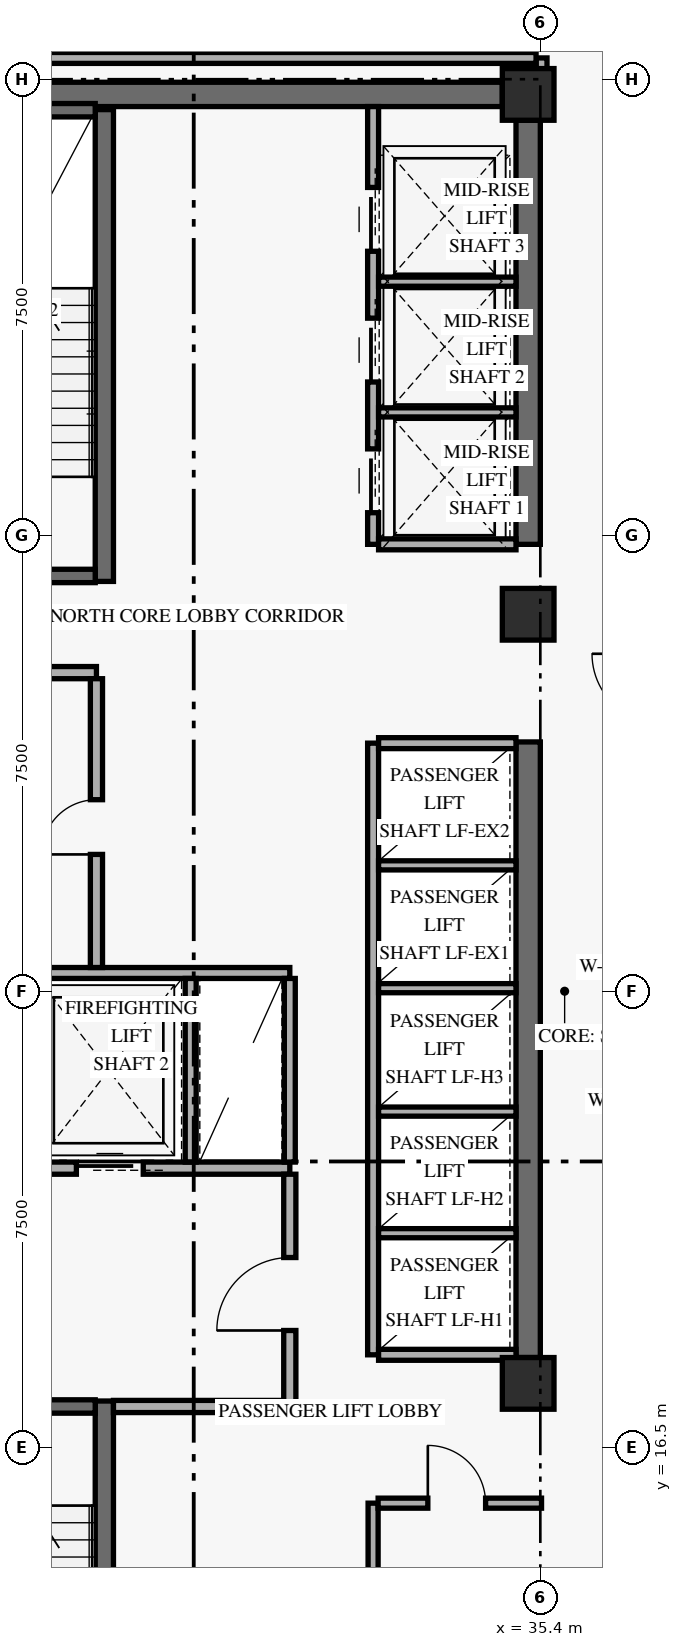
"""IFC4 building model, lengths in metres.
Left out: names, types, materials, properties, quantities, classifications, styles, units other than length and angle.
Written with IfcOpenShell. Run it as: python <this file> out.ifc"""

import sys

from ifc_helpers import new_model, si_unit, direction, frame, frame_2d, origin, origin_2d, place, context, subcontext, project, spatial, rectangle, extrude, element, fill, save


model = new_model("IFC4")
c1 = context("Model", 3, precision=1e-05, world=origin(), true_north=direction((0.0, 1.0)))
c2 = subcontext(c1, "Body", "Model", "MODEL_VIEW")
j1 = project(units=[si_unit("LENGTHUNIT", "METRE"), si_unit("PLANEANGLEUNIT", "RADIAN")], contexts=[c1])
p1 = place(None, origin())
s1 = spatial("IfcSite", under=j1, at=p1, CompositionType="ELEMENT")
p2 = place(p1, origin())
s2 = spatial("IfcBuilding", under=s1, at=p2, CompositionType="ELEMENT")
p3 = place(p2, frame((0.0, 0.0, 117.0)))
s3 = spatial("IfcBuildingStorey", under=s2, at=p3, CompositionType="ELEMENT", Elevation=117.0)
p4 = place(p3, frame((35.2, 17.975, 0.0), z_axis=(0.0, 0.0, 1.0), x_axis=(0.0, 1.0, 0.0)))
e1 = element("IfcWall", 1, at=p4, inside=s3, PredefinedType="SHEAR", context=c2, shape_type="SweptSolid", body=[
    extrude(rectangle(XDim=10.125, YDim=0.4, at=frame_2d((5.062, 0.0))), origin(), (0.0, 0.0, 1.0), 3.349),
])
p5 = place(p3, frame((35.2, 31.35, 0.0), z_axis=(0.0, 0.0, 1.0), x_axis=(0.0, 1.0, 0.0)))
e2 = element("IfcWall", 2, at=p5, inside=s3, PredefinedType="SHEAR", context=c2, shape_type="SweptSolid", body=[
    extrude(rectangle(XDim=6.975, YDim=0.4, at=frame_2d((3.487, 0.0))), origin(), (0.0, 0.0, 1.0), 3.349),
])
p6 = place(p3, frame((24.625, 38.75, 0.0), z_axis=(0.0, 0.0, 1.0), x_axis=(1.0, 0.0, 0.0)))
e3 = element("IfcWall", 3, at=p6, inside=s3, PredefinedType="SHEAR", context=c2, shape_type="SweptSolid", body=[
    extrude(rectangle(XDim=10.15, YDim=0.4, at=frame_2d((5.075, 0.0))), origin(), (0.0, 0.0, 1.0), 3.96),
])
p7 = place(p3, frame((28.23, 9.5, 0.0), z_axis=(0.0, 0.0, 1.0), x_axis=(0.0, 1.0, 0.0)))
e4 = element("IfcWall", 4, at=p7, inside=s3, PredefinedType="SHEAR", context=c2, shape_type="SweptSolid", body=[
    extrude(rectangle(XDim=7.76, YDim=0.3, at=frame_2d((3.88, 0.0))), origin(), (0.0, 0.0, 1.0), 3.96),
])
p8 = place(p3, frame((24.92, 17.17, 0.0), z_axis=(0.0, 0.0, 1.0), x_axis=(1.0, 0.0, 0.0)))
e5 = element("IfcWall", 5, at=p8, inside=s3, PredefinedType="SHEAR", context=c2, shape_type="SweptSolid", body=[
    extrude(rectangle(XDim=3.16, YDim=0.22, at=frame_2d((1.58, 0.0))), origin(), (0.0, 0.0, 1.0), 3.96),
])
p9 = place(p8, frame((0.78, 0.0, 0.0)))
e6 = element("IfcOpeningElement", 6, at=p9, cuts=e5, PredefinedType="OPENING", context=c2, shape_type="SweptSolid", body=[
    extrude(rectangle(XDim=1.05, YDim=2.15, at=frame_2d((0.525, 1.075))), frame((0.0, 0.12, 0.0), z_axis=(0.0, -1.0, 0.0), x_axis=(1.0, 0.0, 0.0)), (0.0, 0.0, 1.0), 0.24),
])
p10 = place(p3, frame((28.23, 30.74, 0.0), z_axis=(0.0, 0.0, 1.0), x_axis=(0.0, 1.0, 0.0)))
e7 = element("IfcWall", 7, at=p10, inside=s3, PredefinedType="SHEAR", context=c2, shape_type="SweptSolid", body=[
    extrude(rectangle(XDim=7.76, YDim=0.3, at=frame_2d((3.88, 0.0))), origin(), (0.0, 0.0, 1.0), 3.96),
])
p11 = place(p3, frame((24.92, 30.83, 0.0), z_axis=(0.0, 0.0, 1.0), x_axis=(1.0, 0.0, 0.0)))
e8 = element("IfcWall", 8, at=p11, inside=s3, PredefinedType="SHEAR", context=c2, shape_type="SweptSolid", body=[
    extrude(rectangle(XDim=3.16, YDim=0.22, at=frame_2d((1.58, 0.0))), origin(), (0.0, 0.0, 1.0), 3.96),
])
p12 = place(p11, frame((0.78, 0.0, 0.0)))
e9 = element("IfcOpeningElement", 9, at=p12, cuts=e8, PredefinedType="OPENING", context=c2, shape_type="SweptSolid", body=[
    extrude(rectangle(XDim=1.05, YDim=2.15, at=frame_2d((0.525, 1.075))), frame((0.0, 0.12, 0.0), z_axis=(0.0, -1.0, 0.0), x_axis=(1.0, 0.0, 0.0)), (0.0, 0.0, 1.0), 0.24),
])
p13 = place(p3, frame((24.92, 38.49, 0.0), z_axis=(0.0, 0.0, 1.0), x_axis=(1.0, 0.0, 0.0)))
e10 = element("IfcWall", 10, at=p13, inside=s3, PredefinedType="SHEAR", context=c2, shape_type="SweptSolid", body=[
    extrude(rectangle(XDim=3.16, YDim=0.22, at=frame_2d((1.58, 0.0))), origin(), (0.0, 0.0, 1.0), 3.96),
])
for number, where, z_axis, x_axis in (
    (11, (35.2, 17.55, 0.0), (0.0, 0.0, 1.0), (1.0, 0.0, 0.0)),
    (12, (35.2, 30.2, 0.0), (0.0, 0.0, 1.0), (1.0, 0.0, 0.0)),
    (13, (35.2, 38.75, 0.0), (0.0, 0.0, 1.0), (1.0, 0.0, 0.0)),
):
    element("IfcColumn", number, at=place(p3, frame(where, z_axis=z_axis, x_axis=x_axis)), inside=s3, PredefinedType="COLUMN", context=c2, shape_type="SweptSolid", body=[
        extrude(rectangle(XDim=0.85, YDim=0.85, at=origin_2d()), origin(), (0.0, 0.0, 1.0), 4.2),
    ])
p14 = place(p3, frame((24.45, 21.09, 0.0), z_axis=(0.0, 0.0, 1.0), x_axis=(1.0, 0.0, 0.0)))
e14 = element("IfcWall", 14, at=p14, inside=s3, PredefinedType="STANDARD", context=c2, shape_type="SweptSolid", body=[
    extrude(rectangle(XDim=6.83, YDim=0.2, at=frame_2d((3.415, 0.0))), origin(), (0.0, 0.0, 1.0), 3.96),
])
p15 = place(p14, frame((0.72, 0.0, 0.0)))
e15 = element("IfcOpeningElement", 15, at=p15, cuts=e14, PredefinedType="OPENING", context=c2, shape_type="SweptSolid", body=[
    extrude(rectangle(XDim=1.1, YDim=2.2, at=frame_2d((0.55, 1.1))), frame((0.0, 0.11, 0.0), z_axis=(0.0, -1.0, 0.0), x_axis=(1.0, 0.0, 0.0)), (0.0, 0.0, 1.0), 0.22),
])
p16 = place(p14, frame((3.32, 0.0, 0.0)))
e16 = element("IfcOpeningElement", 16, at=p16, cuts=e14, PredefinedType="OPENING", context=c2, shape_type="SweptSolid", body=[
    extrude(rectangle(XDim=1.1, YDim=2.2, at=frame_2d((0.55, 1.1))), frame((0.0, 0.11, 0.0), z_axis=(0.0, -1.0, 0.0), x_axis=(1.0, 0.0, 0.0)), (0.0, 0.0, 1.0), 0.22),
])
p17 = place(p3, frame((28.38, 17.17, 0.0), z_axis=(0.0, 0.0, 1.0), x_axis=(1.0, 0.0, 0.0)))
e17 = element("IfcWall", 17, at=p17, inside=s3, PredefinedType="STANDARD", context=c2, shape_type="SweptSolid", body=[
    extrude(rectangle(XDim=2.9, YDim=0.2, at=frame_2d((1.45, 0.0))), origin(), (0.0, 0.0, 1.0), 3.96),
])
p18 = place(p3, frame((31.28, 17.07, 0.0), z_axis=(0.0, 0.0, 1.0), x_axis=(0.0, 1.0, 0.0)))
e18 = element("IfcWall", 18, at=p18, inside=s3, PredefinedType="STANDARD", context=c2, shape_type="SweptSolid", body=[
    extrude(rectangle(XDim=3.92, YDim=0.2, at=frame_2d((1.96, 0.0))), origin(), (0.0, 0.0, 1.0), 3.331),
])
p19 = place(p18, frame((1.35, 0.0, 0.0)))
e19 = element("IfcOpeningElement", 19, at=p19, cuts=e18, PredefinedType="OPENING", context=c2, shape_type="SweptSolid", body=[
    extrude(rectangle(XDim=1.2, YDim=2.15, at=frame_2d((0.6, 1.075))), frame((0.0, 0.11, 0.0), z_axis=(0.0, -1.0, 0.0), x_axis=(1.0, 0.0, 0.0)), (0.0, 0.0, 1.0), 0.22),
])
p20 = place(p3, frame((24.45, 24.3, 0.0), z_axis=(0.0, 0.0, 1.0), x_axis=(1.0, 0.0, 0.0)))
e20 = element("IfcWall", 20, at=p20, inside=s3, PredefinedType="STANDARD", context=c2, shape_type="SweptSolid", body=[
    extrude(rectangle(XDim=6.83, YDim=0.18, at=frame_2d((3.415, 0.0))), origin(), (0.0, 0.0, 1.0), 3.96),
])
for number, where, z_axis, x_axis in (
    (21, (29.65, 21.19, 0.0), (0.0, 0.0, 1.0), (0.0, 1.0, 0.0)),
    (22, (31.28, 21.19, 0.0), (0.0, 0.0, 1.0), (0.0, 1.0, 0.0)),
):
    element("IfcWall", number, at=place(p3, frame(where, z_axis=z_axis, x_axis=x_axis)), inside=s3, PredefinedType="STANDARD", context=c2, shape_type="SweptSolid", body=[
        extrude(rectangle(XDim=3.02, YDim=0.18, at=frame_2d((1.51, 0.0))), origin(), (0.0, 0.0, 1.0), 3.96),
    ])
p21 = place(p3, frame((24.45, 29.24, 0.0), z_axis=(0.0, 0.0, 1.0), x_axis=(1.0, 0.0, 0.0)))
e23 = element("IfcWall", 23, at=p21, inside=s3, PredefinedType="STANDARD", context=c2, shape_type="SweptSolid", body=[
    extrude(rectangle(XDim=3.65, YDim=0.2, at=frame_2d((1.825, 0.0))), origin(), (0.0, 0.0, 1.0), 3.96),
])
p22 = place(p3, frame((28.1, 24.39, 0.0), z_axis=(0.0, 0.0, 1.0), x_axis=(0.0, 1.0, 0.0)))
e24 = element("IfcWall", 24, at=p22, inside=s3, PredefinedType="STANDARD", context=c2, shape_type="SweptSolid", body=[
    extrude(rectangle(XDim=4.75, YDim=0.2, at=frame_2d((2.375, 0.0))), origin(), (0.0, 0.0, 1.0), 3.96),
])
p23 = place(p22, frame((1.86, 0.0, 0.0)))
e25 = element("IfcOpeningElement", 25, at=p23, cuts=e24, PredefinedType="OPENING", context=c2, shape_type="SweptSolid", body=[
    extrude(rectangle(XDim=0.9, YDim=2.1, at=frame_2d((0.45, 1.05))), frame((0.0, 0.11, 0.0), z_axis=(0.0, -1.0, 0.0), x_axis=(1.0, 0.0, 0.0)), (0.0, 0.0, 1.0), 0.22),
])
p24 = place(p3, frame((32.65, 18.02, 0.0), z_axis=(0.0, 0.0, 1.0), x_axis=(0.0, 1.0, 0.0)))
e26 = element("IfcWall", 26, at=p24, inside=s3, PredefinedType="STANDARD", context=c2, shape_type="SweptSolid", body=[
    extrude(rectangle(XDim=10.06, YDim=0.18, at=frame_2d((5.03, 0.0))), origin(), (0.0, 0.0, 1.0), 3.96),
])
for number, where, z_axis, x_axis in (
    (27, (32.74, 18.02, 0.0), (0.0, 0.0, 1.0), (1.0, 0.0, 0.0)),
    (28, (32.74, 28.08, 0.0), (0.0, 0.0, 1.0), (1.0, 0.0, 0.0)),
):
    element("IfcWall", number, at=place(p3, frame(where, z_axis=z_axis, x_axis=x_axis)), inside=s3, PredefinedType="STANDARD", context=c2, shape_type="SweptSolid", body=[
        extrude(rectangle(XDim=2.26, YDim=0.18, at=frame_2d((1.13, 0.0))), origin(), (0.0, 0.0, 1.0), 3.96),
    ])
for number, where, z_axis, x_axis in (
    (29, (32.74, 20.02, 0.0), (0.0, 0.0, 1.0), (1.0, 0.0, 0.0)),
    (30, (32.74, 22.02, 0.0), (0.0, 0.0, 1.0), (1.0, 0.0, 0.0)),
    (31, (32.74, 24.05, 0.0), (0.0, 0.0, 1.0), (1.0, 0.0, 0.0)),
    (32, (32.74, 26.07, 0.0), (0.0, 0.0, 1.0), (1.0, 0.0, 0.0)),
):
    element("IfcWall", number, at=place(p3, frame(where, z_axis=z_axis, x_axis=x_axis)), inside=s3, PredefinedType="STANDARD", context=c2, shape_type="SweptSolid", body=[
        extrude(rectangle(XDim=2.26, YDim=0.15, at=frame_2d((1.13, 0.0))), origin(), (0.0, 0.0, 1.0), 3.96),
    ])
p25 = place(p3, frame((32.65, 31.35, 0.0), z_axis=(0.0, 0.0, 1.0), x_axis=(0.0, 1.0, 0.0)))
e33 = element("IfcWall", 33, at=p25, inside=s3, PredefinedType="STANDARD", context=c2, shape_type="SweptSolid", body=[
    extrude(rectangle(XDim=7.2, YDim=0.18, at=frame_2d((3.6, 0.0))), origin(), (0.0, 0.0, 1.0), 3.96),
])
p26 = place(p25, frame((0.52, 0.0, 0.0)))
e34 = element("IfcOpeningElement", 34, at=p26, cuts=e33, PredefinedType="OPENING", context=c2, shape_type="SweptSolid", body=[
    extrude(rectangle(XDim=1.05, YDim=2.2, at=frame_2d((0.525, 1.1))), frame((0.0, 0.1, 0.0), z_axis=(0.0, -1.0, 0.0), x_axis=(1.0, 0.0, 0.0)), (0.0, 0.0, 1.0), 0.2),
])
p27 = place(p25, frame((2.67, 0.0, 0.0)))
e35 = element("IfcOpeningElement", 35, at=p27, cuts=e33, PredefinedType="OPENING", context=c2, shape_type="SweptSolid", body=[
    extrude(rectangle(XDim=1.05, YDim=2.2, at=frame_2d((0.525, 1.1))), frame((0.0, 0.1, 0.0), z_axis=(0.0, -1.0, 0.0), x_axis=(1.0, 0.0, 0.0)), (0.0, 0.0, 1.0), 0.2),
])
p28 = place(p25, frame((4.82, 0.0, 0.0)))
e36 = element("IfcOpeningElement", 36, at=p28, cuts=e33, PredefinedType="OPENING", context=c2, shape_type="SweptSolid", body=[
    extrude(rectangle(XDim=1.05, YDim=2.2, at=frame_2d((0.525, 1.1))), frame((0.0, 0.1, 0.0), z_axis=(0.0, -1.0, 0.0), x_axis=(1.0, 0.0, 0.0)), (0.0, 0.0, 1.0), 0.2),
])
p29 = place(p3, frame((32.74, 31.35, 0.0), z_axis=(0.0, 0.0, 1.0), x_axis=(1.0, 0.0, 0.0)))
e37 = element("IfcWall", 37, at=p29, inside=s3, PredefinedType="STANDARD", context=c2, shape_type="SweptSolid", body=[
    extrude(rectangle(XDim=2.26, YDim=0.18, at=frame_2d((1.13, 0.0))), origin(), (0.0, 0.0, 1.0), 3.96),
])
for number, where, z_axis, x_axis in (
    (38, (32.74, 33.52, 0.0), (0.0, 0.0, 1.0), (1.0, 0.0, 0.0)),
    (39, (32.74, 35.67, 0.0), (0.0, 0.0, 1.0), (1.0, 0.0, 0.0)),
):
    element("IfcWall", number, at=place(p3, frame(where, z_axis=z_axis, x_axis=x_axis)), inside=s3, PredefinedType="STANDARD", context=c2, shape_type="SweptSolid", body=[
        extrude(rectangle(XDim=2.26, YDim=0.15, at=frame_2d((1.13, 0.0))), origin(), (0.0, 0.0, 1.0), 3.96),
    ])
p30 = place(p3, frame((35.42, 38.75, 0.0), z_axis=(0.0, 0.0, 1.0), x_axis=(0.0, 1.0, 0.0)))
e40 = element("IfcWall", 40, at=p30, inside=s3, PredefinedType="STANDARD", context=c2, shape_type="SweptSolid", body=[
    extrude(rectangle(XDim=0.6, YDim=0.18, at=frame_2d((0.3, 0.0))), origin(), (0.0, 0.0, 1.0), 3.331),
])
p31 = place(p3, frame((32.65, 9.5, 0.0), z_axis=(0.0, 0.0, 1.0), x_axis=(0.0, 1.0, 0.0)))
e41 = element("IfcWall", 41, at=p31, inside=s3, PredefinedType="PARTITIONING", context=c2, shape_type="SweptSolid", body=[
    extrude(rectangle(XDim=6.08, YDim=0.165, at=frame_2d((3.04, 0.0))), origin(), (0.0, 0.0, 1.0), 3.96),
])
p32 = place(p3, frame((32.732, 15.58, 0.0), z_axis=(0.0, 0.0, 1.0), x_axis=(1.0, 0.0, 0.0)))
e42 = element("IfcWall", 42, at=p32, inside=s3, PredefinedType="PARTITIONING", context=c2, shape_type="SweptSolid", body=[
    extrude(rectangle(XDim=2.688, YDim=0.165, at=frame_2d((1.344, 0.0))), origin(), (0.0, 0.0, 1.0), 3.331),
])
p33 = place(p32, frame((0.817, 0.0, 0.0)))
e43 = element("IfcOpeningElement", 43, at=p33, cuts=e42, PredefinedType="OPENING", context=c2, shape_type="SweptSolid", body=[
    extrude(rectangle(XDim=0.95, YDim=2.15, at=frame_2d((0.475, 1.075))), frame((0.0, 0.093, 0.0), z_axis=(0.0, -1.0, 0.0), x_axis=(1.0, 0.0, 0.0)), (0.0, 0.0, 1.0), 0.185),
])
p34 = place(p3, frame((23.85, 39.35, 0.0), z_axis=(0.0, 0.0, 1.0), x_axis=(1.0, 0.0, 0.0)))
e44 = element("IfcWall", 44, at=p34, inside=s3, PredefinedType="STANDARD", context=c2, shape_type="SweptSolid", body=[
    extrude(rectangle(XDim=11.48, YDim=0.18, at=frame_2d((5.74, 0.0))), origin(), (0.0, 0.0, 1.0), 3.331),
])
p35 = place(p16, origin())
e45 = element("IfcDoor", 45, at=p35, inside=s3, OperationType="SLIDING_TO_LEFT", PredefinedType="DOOR", context=c2, shape_type="SweptSolid", body=[
    extrude(rectangle(XDim=1.1, YDim=2.2, at=frame_2d((0.55, 1.1))), frame((0.0, 0.025, 0.0), z_axis=(0.0, -1.0, 0.0), x_axis=(1.0, 0.0, 0.0)), (0.0, 0.0, 1.0), 0.05),
])
fill(e16, e45)
p36 = place(p19, origin())
e46 = element("IfcDoor", 46, at=p36, inside=s3, OperationType="SINGLE_SWING_LEFT", PredefinedType="DOOR", context=c2, shape_type="SweptSolid", body=[
    extrude(rectangle(XDim=1.2, YDim=2.15, at=frame_2d((0.6, 1.075))), frame((0.0, 0.025, 0.0), z_axis=(0.0, -1.0, 0.0), x_axis=(1.0, 0.0, 0.0)), (0.0, 0.0, 1.0), 0.05),
])
fill(e19, e46)
p37 = place(p23, origin())
e47 = element("IfcDoor", 47, at=p37, inside=s3, OperationType="SINGLE_SWING_LEFT", PredefinedType="DOOR", context=c2, shape_type="SweptSolid", body=[
    extrude(rectangle(XDim=0.9, YDim=2.1, at=frame_2d((0.45, 1.05))), frame((0.0, 0.025, 0.0), z_axis=(0.0, -1.0, 0.0), x_axis=(1.0, 0.0, 0.0)), (0.0, 0.0, 1.0), 0.05),
])
fill(e25, e47)
p38 = place(p26, origin())
e48 = element("IfcDoor", 48, at=p38, inside=s3, OperationType="SLIDING_TO_LEFT", PredefinedType="DOOR", context=c2, shape_type="SweptSolid", body=[
    extrude(rectangle(XDim=1.05, YDim=2.2, at=frame_2d((0.525, 1.1))), frame((0.0, 0.025, 0.0), z_axis=(0.0, -1.0, 0.0), x_axis=(1.0, 0.0, 0.0)), (0.0, 0.0, 1.0), 0.05),
])
fill(e34, e48)
p39 = place(p27, origin())
e49 = element("IfcDoor", 49, at=p39, inside=s3, OperationType="SLIDING_TO_LEFT", PredefinedType="DOOR", context=c2, shape_type="SweptSolid", body=[
    extrude(rectangle(XDim=1.05, YDim=2.2, at=frame_2d((0.525, 1.1))), frame((0.0, 0.025, 0.0), z_axis=(0.0, -1.0, 0.0), x_axis=(1.0, 0.0, 0.0)), (0.0, 0.0, 1.0), 0.05),
])
fill(e35, e49)
p40 = place(p28, origin())
e50 = element("IfcDoor", 50, at=p40, inside=s3, OperationType="SLIDING_TO_LEFT", PredefinedType="DOOR", context=c2, shape_type="SweptSolid", body=[
    extrude(rectangle(XDim=1.05, YDim=2.2, at=frame_2d((0.525, 1.1))), frame((0.0, 0.025, 0.0), z_axis=(0.0, -1.0, 0.0), x_axis=(1.0, 0.0, 0.0)), (0.0, 0.0, 1.0), 0.05),
])
fill(e36, e50)
p41 = place(p33, origin())
e51 = element("IfcDoor", 51, at=p41, inside=s3, OperationType="SINGLE_SWING_LEFT", PredefinedType="DOOR", context=c2, shape_type="SweptSolid", body=[
    extrude(rectangle(XDim=0.95, YDim=2.15, at=frame_2d((0.475, 1.075))), frame((0.0, 0.025, 0.0), z_axis=(0.0, -1.0, 0.0), x_axis=(1.0, 0.0, 0.0)), (0.0, 0.0, 1.0), 0.05),
])
fill(e43, e51)
save(model, sys.argv[1])
